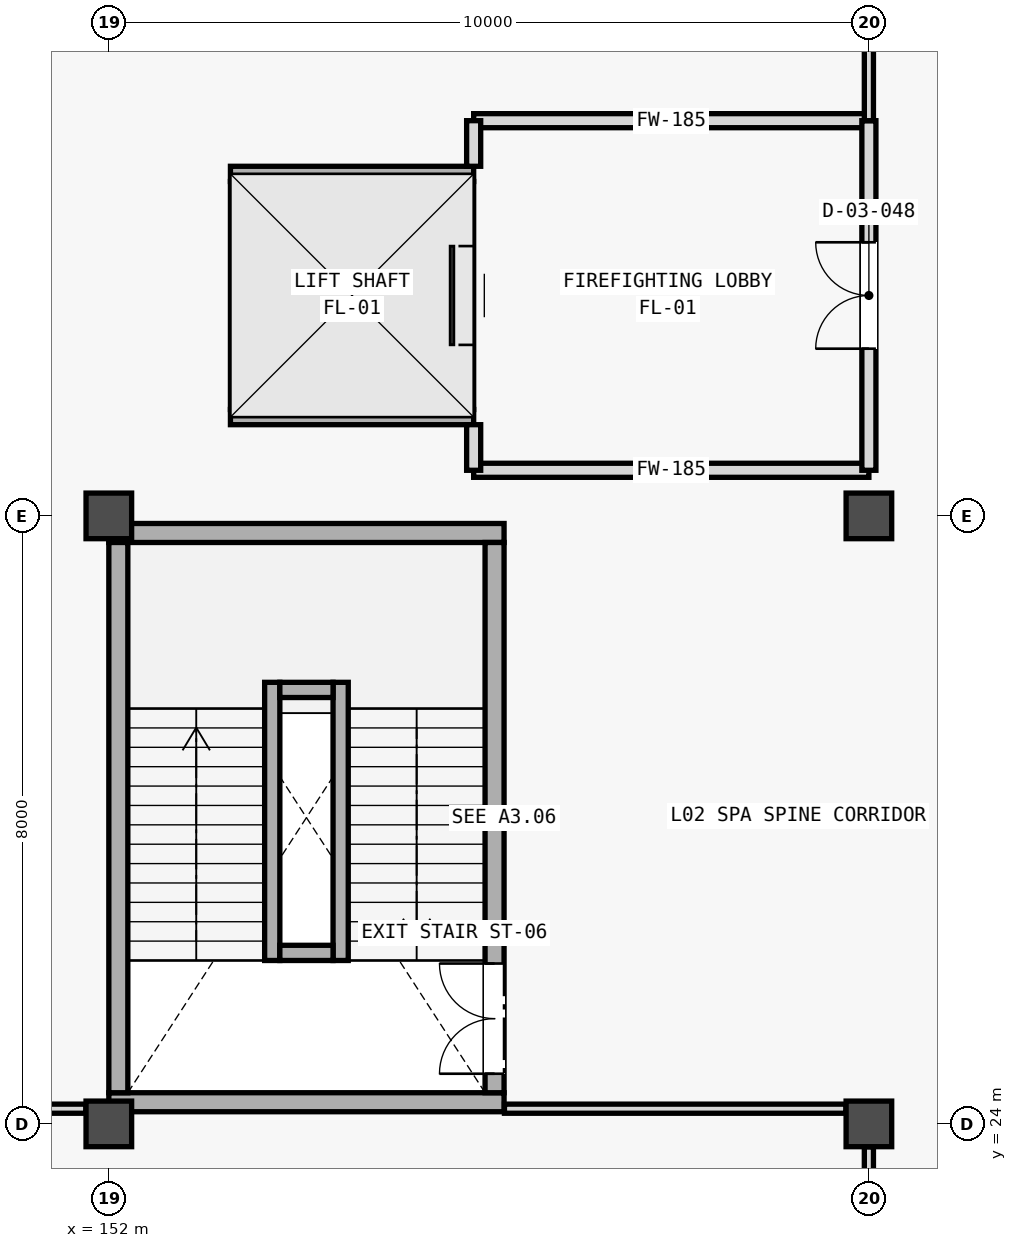
"""IFC4 building model, lengths in metres.
Left out: names, types, materials, properties, quantities, classifications, styles, units other than length and angle.
Written with IfcOpenShell. Run it as: python <this file> out.ifc"""

import sys

from ifc_helpers import new_model, si_unit, direction, frame, frame_2d, origin, origin_2d, place, context, subcontext, project, spatial, rectangle, extrude, element, fill, save


model = new_model("IFC4")
c1 = context("Model", 3, precision=1e-05, world=origin(), true_north=direction((0.0, 1.0)))
c2 = subcontext(c1, "Body", "Model", "MODEL_VIEW")
j1 = project(units=[si_unit("LENGTHUNIT", "METRE"), si_unit("PLANEANGLEUNIT", "RADIAN")], contexts=[c1])
p1 = place(None, origin())
s1 = spatial("IfcSite", under=j1, at=p1, CompositionType="ELEMENT")
p2 = place(p1, origin())
s2 = spatial("IfcBuilding", under=s1, at=p2, CompositionType="ELEMENT")
p3 = place(p2, frame((0.0, 0.0, 10.2)))
s3 = spatial("IfcBuildingStorey", under=s2, at=p3, CompositionType="ELEMENT", Elevation=10.2)
for number, where, z_axis, x_axis in (
    (1, (152.0, 24.0, 0.0), (0.0, 0.0, 1.0), (1.0, 0.0, 0.0)),
    (2, (162.0, 24.0, 0.0), (0.0, 0.0, 1.0), (1.0, 0.0, 0.0)),
    (3, (152.0, 32.0, 0.0), (0.0, 0.0, 1.0), (1.0, 0.0, 0.0)),
    (4, (162.0, 32.0, 0.0), (0.0, 0.0, 1.0), (1.0, 0.0, 0.0)),
):
    element("IfcColumn", number, at=place(p3, frame(where, z_axis=z_axis, x_axis=x_axis)), inside=s3, PredefinedType="COLUMN", context=c2, shape_type="SweptSolid", body=[
        extrude(rectangle(XDim=0.6, YDim=0.6, at=origin_2d()), origin(), (0.0, 0.0, 1.0), 3.96),
    ])
for number, where, z_axis, x_axis in (
    (5, (152.0, 24.285, 0.0), (0.0, 0.0, 1.0), (1.0, 0.0, 0.0)),
    (6, (152.0, 31.775, 0.0), (0.0, 0.0, 1.0), (1.0, 0.0, 0.0)),
):
    element("IfcWall", number, at=place(p3, frame(where, z_axis=z_axis, x_axis=x_axis)), inside=s3, PredefinedType="SHEAR", context=c2, shape_type="SweptSolid", body=[
        extrude(rectangle(XDim=5.2, YDim=0.25, at=frame_2d((2.6, 0.0))), origin(), (0.0, 0.0, 1.0), 4.2),
    ])
p4 = place(p3, frame((152.125, 24.41, 0.0), z_axis=(0.0, 0.0, 1.0), x_axis=(0.0, 1.0, 0.0)))
e7 = element("IfcWall", 7, at=p4, inside=s3, PredefinedType="SHEAR", context=c2, shape_type="SweptSolid", body=[
    extrude(rectangle(XDim=7.24, YDim=0.25, at=frame_2d((3.62, 0.0))), origin(), (0.0, 0.0, 1.0), 4.2),
])
p5 = place(p3, frame((157.075, 24.41, 0.0), z_axis=(0.0, 0.0, 1.0), x_axis=(0.0, 1.0, 0.0)))
e8 = element("IfcWall", 8, at=p5, inside=s3, PredefinedType="SHEAR", context=c2, shape_type="SweptSolid", body=[
    extrude(rectangle(XDim=7.24, YDim=0.25, at=frame_2d((3.62, 0.0))), origin(), (0.0, 0.0, 1.0), 4.2),
])
p6 = place(p5, frame((0.25, 0.0, 0.0)))
e9 = element("IfcOpeningElement", 9, at=p6, cuts=e8, PredefinedType="OPENING", context=c2, shape_type="SweptSolid", body=[
    extrude(rectangle(XDim=1.45, YDim=2.2, at=frame_2d((0.725, 1.1))), frame((0.0, 0.135, 0.0), z_axis=(0.0, -1.0, 0.0), x_axis=(1.0, 0.0, 0.0)), (0.0, 0.0, 1.0), 0.27),
])
for number, where, z_axis, x_axis in (
    (10, (154.15, 26.15, 0.0), (0.0, 0.0, 1.0), (0.0, 1.0, 0.0)),
    (11, (155.05, 26.15, 0.0), (0.0, 0.0, 1.0), (0.0, 1.0, 0.0)),
):
    element("IfcWall", number, at=place(p3, frame(where, z_axis=z_axis, x_axis=x_axis)), inside=s3, PredefinedType="SHEAR", context=c2, shape_type="SweptSolid", body=[
        extrude(rectangle(XDim=3.66, YDim=0.2, at=frame_2d((1.83, 0.0))), origin(), (0.0, 0.0, 1.0), 4.2),
    ])
for number, where, z_axis, x_axis in (
    (12, (154.25, 26.25, 0.0), (0.0, 0.0, 1.0), (1.0, 0.0, 0.0)),
    (13, (154.25, 29.71, 0.0), (0.0, 0.0, 1.0), (1.0, 0.0, 0.0)),
):
    element("IfcWall", number, at=place(p3, frame(where, z_axis=z_axis, x_axis=x_axis)), inside=s3, PredefinedType="SHEAR", context=c2, shape_type="SweptSolid", body=[
        extrude(rectangle(XDim=0.7, YDim=0.2, at=frame_2d((0.35, 0.0))), origin(), (0.0, 0.0, 1.0), 4.2),
    ])
for number, where, z_axis, x_axis in (
    (14, (153.6, 33.3, 0.0), (0.0, 0.0, 1.0), (1.0, 0.0, 0.0)),
    (15, (153.6, 36.5, 0.0), (0.0, 0.0, 1.0), (1.0, 0.0, 0.0)),
):
    element("IfcWall", number, at=place(p3, frame(where, z_axis=z_axis, x_axis=x_axis)), inside=s3, PredefinedType="SHEAR", context=c2, shape_type="SweptSolid", body=[
        extrude(rectangle(XDim=3.2, YDim=0.2, at=frame_2d((1.6, 0.0))), origin(), (0.0, 0.0, 1.0), 4.2),
    ])
p7 = place(p3, frame((153.7, 33.4, 0.0), z_axis=(0.0, 0.0, 1.0), x_axis=(0.0, 1.0, 0.0)))
e16 = element("IfcWall", 16, at=p7, inside=s3, PredefinedType="SHEAR", context=c2, shape_type="SweptSolid", body=[
    extrude(rectangle(XDim=3.0, YDim=0.2, at=frame_2d((1.5, 0.0))), origin(), (0.0, 0.0, 1.0), 4.2),
])
p8 = place(p3, frame((156.7, 33.4, 0.0), z_axis=(0.0, 0.0, 1.0), x_axis=(0.0, 1.0, 0.0)))
e17 = element("IfcWall", 17, at=p8, inside=s3, PredefinedType="SHEAR", context=c2, shape_type="SweptSolid", body=[
    extrude(rectangle(XDim=3.0, YDim=0.2, at=frame_2d((1.5, 0.0))), origin(), (0.0, 0.0, 1.0), 4.2),
])
p9 = place(p8, frame((0.85, 0.0, 0.0)))
e18 = element("IfcOpeningElement", 18, at=p9, cuts=e17, PredefinedType="OPENING", context=c2, shape_type="SweptSolid", body=[
    extrude(rectangle(XDim=1.3, YDim=2.3, at=frame_2d((0.65, 1.15))), frame((0.0, 0.11, 0.0), z_axis=(0.0, -1.0, 0.0), x_axis=(1.0, 0.0, 0.0)), (0.0, 0.0, 1.0), 0.22),
])
for number, where, z_axis, x_axis in (
    (19, (162.0, 32.6, 0.0), (0.0, 0.0, 1.0), (-1.0, 0.0, 0.0)),
    (20, (156.8, 37.2, 0.0), (0.0, 0.0, 1.0), (1.0, 0.0, 0.0)),
):
    element("IfcWall", number, at=place(p3, frame(where, z_axis=z_axis, x_axis=x_axis)), inside=s3, PredefinedType="STANDARD", context=c2, shape_type="SweptSolid", body=[
        extrude(rectangle(XDim=5.2, YDim=0.185, at=frame_2d((2.6, 0.0))), origin(), (0.0, 0.0, 1.0), 3.24),
    ])
p10 = place(p3, frame((162.0, 32.6, 0.0), z_axis=(0.0, 0.0, 1.0), x_axis=(0.0, 1.0, 0.0)))
e21 = element("IfcWall", 21, at=p10, inside=s3, PredefinedType="STANDARD", context=c2, shape_type="SweptSolid", body=[
    extrude(rectangle(XDim=4.6, YDim=0.185, at=frame_2d((2.3, 0.0))), origin(), (0.0, 0.0, 1.0), 3.24),
])
p11 = place(p10, frame((1.6, 0.0, 0.0)))
e22 = element("IfcOpeningElement", 22, at=p11, cuts=e21, PredefinedType="OPENING", context=c2, shape_type="SweptSolid", body=[
    extrude(rectangle(XDim=1.4, YDim=2.2, at=frame_2d((0.7, 1.1))), frame((0.0, 0.103, 0.0), z_axis=(0.0, -1.0, 0.0), x_axis=(1.0, 0.0, 0.0)), (0.0, 0.0, 1.0), 0.205),
])
for number, where, z_axis, x_axis in (
    (23, (156.8, 32.6, 0.0), (0.0, 0.0, 1.0), (0.0, 1.0, 0.0)),
    (24, (156.8, 36.6, 0.0), (0.0, 0.0, 1.0), (0.0, 1.0, 0.0)),
):
    element("IfcWall", number, at=place(p3, frame(where, z_axis=z_axis, x_axis=x_axis)), inside=s3, PredefinedType="STANDARD", context=c2, shape_type="SweptSolid", body=[
        extrude(rectangle(XDim=0.6, YDim=0.185, at=frame_2d((0.3, 0.0))), origin(), (0.0, 0.0, 1.0), 3.24),
    ])
p12 = place(p3, frame((162.0, 16.252, 0.0), z_axis=(0.0, 0.0, 1.0), x_axis=(0.0, 1.0, 0.0)))
e25 = element("IfcWall", 25, at=p12, inside=s3, PredefinedType="PARTITIONING", context=c2, shape_type="SweptSolid", body=[
    extrude(rectangle(XDim=7.446, YDim=0.12, at=frame_2d((3.723, 0.0))), origin(), (0.0, 0.0, 1.0), 3.24),
])
p13 = place(p12, frame((2.748, 0.0, 0.0)))
e26 = element("IfcOpeningElement", 26, at=p13, cuts=e25, PredefinedType="OPENING", context=c2, shape_type="SweptSolid", body=[
    extrude(rectangle(XDim=1.0, YDim=2.15, at=frame_2d((0.5, 1.075))), frame((0.0, 0.07, 0.0), z_axis=(0.0, -1.0, 0.0), x_axis=(1.0, 0.0, 0.0)), (0.0, 0.0, 1.0), 0.14),
])
p14 = place(p3, frame((162.0, 37.2, 0.0), z_axis=(0.0, 0.0, 1.0), x_axis=(0.0, 1.0, 0.0)))
e27 = element("IfcWall", 27, at=p14, inside=s3, PredefinedType="PARTITIONING", context=c2, shape_type="SweptSolid", body=[
    extrude(rectangle(XDim=2.498, YDim=0.12, at=frame_2d((1.249, 0.0))), origin(), (0.0, 0.0, 1.0), 3.24),
])
p15 = place(p3, frame((144.277, 24.2, 0.0), z_axis=(0.0, 0.0, 1.0), x_axis=(1.0, 0.0, 0.0)))
e28 = element("IfcWall", 28, at=p15, inside=s3, PredefinedType="PARTITIONING", context=c2, shape_type="SweptSolid", body=[
    extrude(rectangle(XDim=7.421, YDim=0.12, at=frame_2d((3.71, 0.0))), origin(), (0.0, 0.0, 1.0), 3.945),
])
p16 = place(p3, frame((157.205, 24.2, 0.0), z_axis=(0.0, 0.0, 1.0), x_axis=(1.0, 0.0, 0.0)))
e29 = element("IfcWall", 29, at=p16, inside=s3, PredefinedType="PARTITIONING", context=c2, shape_type="SweptSolid", body=[
    extrude(rectangle(XDim=4.493, YDim=0.12, at=frame_2d((2.247, 0.0))), origin(), (0.0, 0.0, 1.0), 3.24),
])
p17 = place(p6, origin())
e30 = element("IfcDoor", 30, at=p17, inside=s3, OperationType="DOUBLE_DOOR_SINGLE_SWING", PredefinedType="DOOR", context=c2, shape_type="SweptSolid", body=[
    extrude(rectangle(XDim=1.45, YDim=2.2, at=frame_2d((0.725, 1.1))), frame((0.0, 0.025, 0.0), z_axis=(0.0, -1.0, 0.0), x_axis=(1.0, 0.0, 0.0)), (0.0, 0.0, 1.0), 0.05),
])
fill(e9, e30)
p18 = place(p9, origin())
e31 = element("IfcDoor", 31, at=p18, inside=s3, OperationType="SLIDING_TO_RIGHT", PredefinedType="DOOR", context=c2, shape_type="SweptSolid", body=[
    extrude(rectangle(XDim=1.3, YDim=2.3, at=frame_2d((0.65, 1.15))), frame((0.0, 0.025, 0.0), z_axis=(0.0, -1.0, 0.0), x_axis=(1.0, 0.0, 0.0)), (0.0, 0.0, 1.0), 0.05),
])
fill(e18, e31)
p19 = place(p11, origin())
e32 = element("IfcDoor", 32, at=p19, inside=s3, OperationType="DOUBLE_DOOR_SINGLE_SWING", PredefinedType="DOOR", context=c2, shape_type="SweptSolid", body=[
    extrude(rectangle(XDim=1.4, YDim=2.2, at=frame_2d((0.7, 1.1))), frame((0.0, 0.025, 0.0), z_axis=(0.0, -1.0, 0.0), x_axis=(1.0, 0.0, 0.0)), (0.0, 0.0, 1.0), 0.05),
])
fill(e22, e32)
save(model, sys.argv[1])
